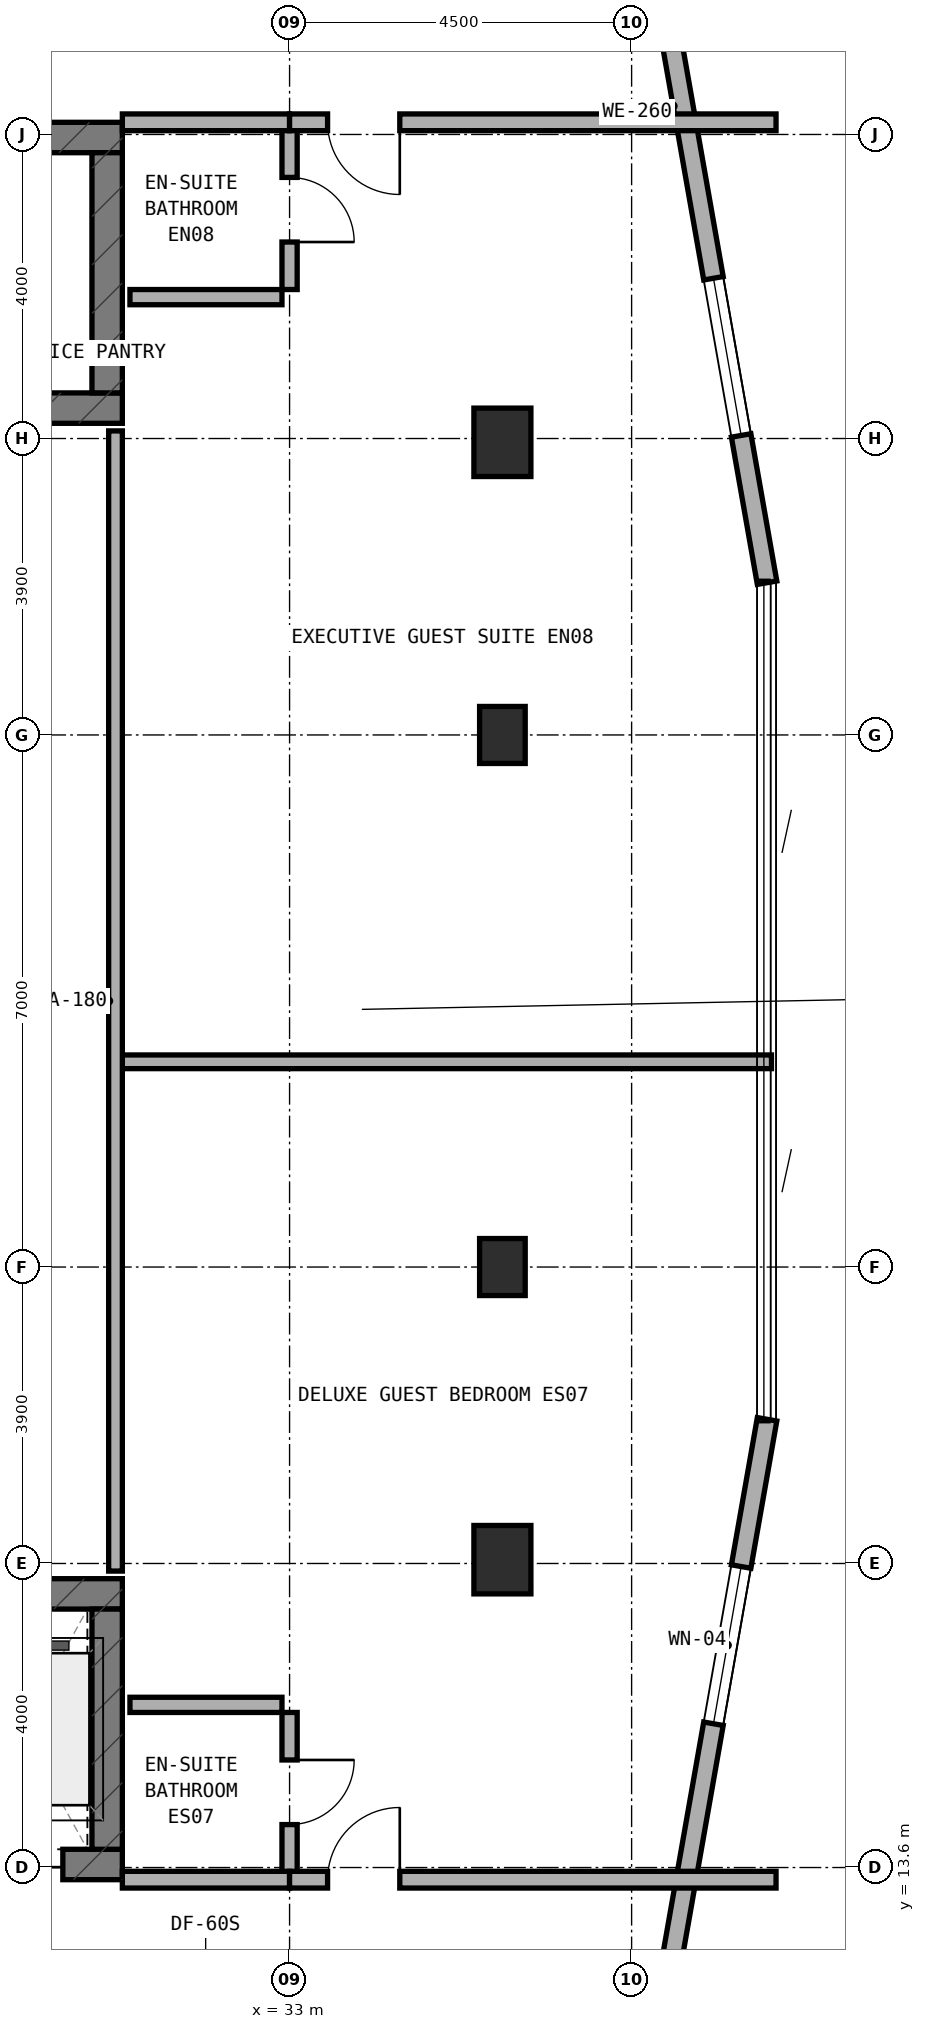
"""IFC4 building model, lengths in metres.
Left out: names, types, materials, properties, quantities, classifications, styles, units other than length and angle.
Written with IfcOpenShell. Run it as: python <this file> out.ifc"""

import sys

from ifc_helpers import new_model, si_unit, direction, frame, frame_2d, origin, origin_2d, place, context, subcontext, project, spatial, rectangle, extrude, element, fill, save


model = new_model("IFC4")
c1 = context("Model", 3, precision=1e-05, world=origin(), true_north=direction((0.0, 1.0)))
c2 = subcontext(c1, "Body", "Model", "MODEL_VIEW")
j1 = project(units=[si_unit("LENGTHUNIT", "METRE"), si_unit("PLANEANGLEUNIT", "RADIAN")], contexts=[c1])
p1 = place(None, origin())
s1 = spatial("IfcSite", under=j1, at=p1, CompositionType="ELEMENT")
p2 = place(p1, origin())
s2 = spatial("IfcBuilding", under=s1, at=p2, CompositionType="ELEMENT")
p3 = place(p2, frame((0.0, 0.0, 246.8)))
s3 = spatial("IfcBuildingStorey", under=s2, at=p3, CompositionType="ELEMENT", Elevation=246.8)
p4 = place(p3, frame((6.4, 32.8, 0.0), z_axis=(0.0, 0.0, 1.0), x_axis=(1.0, 0.0, 0.0)))
e1 = element("IfcWall", 1, at=p4, inside=s3, PredefinedType="SHEAR", context=c2, shape_type="SweptSolid", body=[
    extrude(rectangle(XDim=24.4, YDim=0.4, at=frame_2d((12.2, 0.0))), origin(), (0.0, 0.0, 1.0), 3.6),
])
p5 = place(p4, frame((6.05, 0.0, 0.0)))
e2 = element("IfcOpeningElement", 2, at=p5, cuts=e1, PredefinedType="OPENING", context=c2, shape_type="SweptSolid", body=[
    extrude(rectangle(XDim=1.1, YDim=2.15, at=frame_2d((0.55, 1.075))), frame((0.0, 0.21, 0.0), z_axis=(0.0, -1.0, 0.0), x_axis=(1.0, 0.0, 0.0)), (0.0, 0.0, 1.0), 0.42),
])
p6 = place(p3, frame((6.4, 36.36, 0.0), z_axis=(0.0, 0.0, 1.0), x_axis=(1.0, 0.0, 0.0)))
e3 = element("IfcWall", 3, at=p6, inside=s3, PredefinedType="SHEAR", context=c2, shape_type="SweptSolid", body=[
    extrude(rectangle(XDim=24.4, YDim=0.4, at=frame_2d((12.2, 0.0))), origin(), (0.0, 0.0, 1.0), 3.6),
])
p7 = place(p6, frame((9.15, 0.0, 0.0)))
e4 = element("IfcOpeningElement", 4, at=p7, cuts=e3, PredefinedType="OPENING", context=c2, shape_type="SweptSolid", body=[
    extrude(rectangle(XDim=1.2, YDim=2.15, at=frame_2d((0.6, 1.075))), frame((0.0, 0.21, 0.0), z_axis=(0.0, -1.0, 0.0), x_axis=(1.0, 0.0, 0.0)), (0.0, 0.0, 1.0), 0.42),
])
p8 = place(p6, frame((19.2, 0.0, 0.0)))
e5 = element("IfcOpeningElement", 5, at=p8, cuts=e3, PredefinedType="OPENING", context=c2, shape_type="SweptSolid", body=[
    extrude(rectangle(XDim=0.85, YDim=2.1, at=frame_2d((0.425, 1.05))), frame((0.0, 0.21, 0.0), z_axis=(0.0, -1.0, 0.0), x_axis=(1.0, 0.0, 0.0)), (0.0, 0.0, 1.0), 0.42),
])
p9 = place(p6, frame((17.22, 0.0, 0.0)))
e6 = element("IfcOpeningElement", 6, at=p9, cuts=e3, PredefinedType="OPENING", context=c2, shape_type="SweptSolid", body=[
    extrude(rectangle(XDim=0.85, YDim=2.1, at=frame_2d((0.425, 1.05))), frame((0.0, 0.21, 0.0), z_axis=(0.0, -1.0, 0.0), x_axis=(1.0, 0.0, 0.0)), (0.0, 0.0, 1.0), 0.42),
])
p10 = place(p3, frame((30.6, 33.0, 0.0), z_axis=(0.0, 0.0, 1.0), x_axis=(0.0, 1.0, 0.0)))
e7 = element("IfcWall", 7, at=p10, inside=s3, PredefinedType="SHEAR", context=c2, shape_type="SweptSolid", body=[
    extrude(rectangle(XDim=3.16, YDim=0.4, at=frame_2d((1.58, 0.0))), origin(), (0.0, 0.0, 1.0), 3.6),
])
p11 = place(p3, frame((6.4, 13.64, 0.0), z_axis=(0.0, 0.0, 1.0), x_axis=(1.0, 0.0, 0.0)))
e8 = element("IfcWall", 8, at=p11, inside=s3, PredefinedType="SHEAR", context=c2, shape_type="SweptSolid", body=[
    extrude(rectangle(XDim=24.4, YDim=0.4, at=frame_2d((12.2, 0.0))), origin(), (0.0, 0.0, 1.0), 3.6),
])
p12 = place(p11, frame((9.15, 0.0, 0.0)))
e9 = element("IfcOpeningElement", 9, at=p12, cuts=e8, PredefinedType="OPENING", context=c2, shape_type="SweptSolid", body=[
    extrude(rectangle(XDim=1.2, YDim=2.15, at=frame_2d((0.6, 1.075))), frame((0.0, 0.21, 0.0), z_axis=(0.0, -1.0, 0.0), x_axis=(1.0, 0.0, 0.0)), (0.0, 0.0, 1.0), 0.42),
])
p13 = place(p11, frame((17.22, 0.0, 0.0)))
e10 = element("IfcOpeningElement", 10, at=p13, cuts=e8, PredefinedType="OPENING", context=c2, shape_type="SweptSolid", body=[
    extrude(rectangle(XDim=0.85, YDim=2.1, at=frame_2d((0.425, 1.05))), frame((0.0, 0.21, 0.0), z_axis=(0.0, -1.0, 0.0), x_axis=(1.0, 0.0, 0.0)), (0.0, 0.0, 1.0), 0.42),
])
p14 = place(p11, frame((18.783, 0.0, 0.0)))
e11 = element("IfcOpeningElement", 11, at=p14, cuts=e8, PredefinedType="OPENING", context=c2, shape_type="SweptSolid", body=[
    extrude(rectangle(XDim=1.1, YDim=2.15, at=frame_2d((0.55, 1.075))), frame((0.0, 0.21, 0.0), z_axis=(0.0, -1.0, 0.0), x_axis=(1.0, 0.0, 0.0)), (0.0, 0.0, 1.0), 0.42),
])
p15 = place(p11, frame((20.65, 0.0, 0.0)))
e12 = element("IfcOpeningElement", 12, at=p15, cuts=e8, PredefinedType="OPENING", context=c2, shape_type="SweptSolid", body=[
    extrude(rectangle(XDim=1.1, YDim=2.15, at=frame_2d((0.55, 1.075))), frame((0.0, 0.21, 0.0), z_axis=(0.0, -1.0, 0.0), x_axis=(1.0, 0.0, 0.0)), (0.0, 0.0, 1.0), 0.42),
])
p16 = place(p11, frame((22.517, 0.0, 0.0)))
e13 = element("IfcOpeningElement", 13, at=p16, cuts=e8, PredefinedType="OPENING", context=c2, shape_type="SweptSolid", body=[
    extrude(rectangle(XDim=1.1, YDim=2.15, at=frame_2d((0.55, 1.075))), frame((0.0, 0.21, 0.0), z_axis=(0.0, -1.0, 0.0), x_axis=(1.0, 0.0, 0.0)), (0.0, 0.0, 1.0), 0.42),
])
p17 = place(p3, frame((6.4, 17.2, 0.0), z_axis=(0.0, 0.0, 1.0), x_axis=(1.0, 0.0, 0.0)))
e14 = element("IfcWall", 14, at=p17, inside=s3, PredefinedType="SHEAR", context=c2, shape_type="SweptSolid", body=[
    extrude(rectangle(XDim=24.4, YDim=0.4, at=frame_2d((12.2, 0.0))), origin(), (0.0, 0.0, 1.0), 3.6),
])
p18 = place(p3, frame((30.6, 13.84, 0.0), z_axis=(0.0, 0.0, 1.0), x_axis=(0.0, 1.0, 0.0)))
e15 = element("IfcWall", 15, at=p18, inside=s3, PredefinedType="SHEAR", context=c2, shape_type="SweptSolid", body=[
    extrude(rectangle(XDim=3.16, YDim=0.4, at=frame_2d((1.58, 0.0))), origin(), (0.0, 0.0, 1.0), 3.6),
])
for number, where, z_axis, x_axis in (
    (16, (35.8, 21.5, 0.0), (0.0, 0.0, 1.0), (1.0, 0.0, 0.0)),
    (17, (35.8, 28.5, 0.0), (0.0, 0.0, 1.0), (1.0, 0.0, 0.0)),
):
    element("IfcColumn", number, at=place(p3, frame(where, z_axis=z_axis, x_axis=x_axis)), inside=s3, PredefinedType="COLUMN", context=c2, shape_type="SweptSolid", body=[
        extrude(rectangle(XDim=0.6, YDim=0.75, at=origin_2d()), origin(), (0.0, 0.0, 1.0), 3.6),
    ])
for number, where, z_axis, x_axis in (
    (18, (35.8, 17.65, 0.0), (0.0, 0.0, 1.0), (1.0, 0.0, 0.0)),
    (19, (35.8, 32.35, 0.0), (0.0, 0.0, 1.0), (1.0, 0.0, 0.0)),
):
    element("IfcColumn", number, at=place(p3, frame(where, z_axis=z_axis, x_axis=x_axis)), inside=s3, PredefinedType="COLUMN", context=c2, shape_type="SweptSolid", body=[
        extrude(rectangle(XDim=0.75, YDim=0.9, at=origin_2d()), origin(), (0.0, 0.0, 1.0), 3.6),
    ])
p19 = place(p3, frame((37.771, 10.915, 0.0), z_axis=(0.0, 0.0, 1.0), x_axis=(0.173396937698, 0.984852020355, 0.0)))
e20 = element("IfcWall", 20, at=p19, inside=s3, PredefinedType="STANDARD", context=c2, shape_type="SweptSolid", body=[
    extrude(rectangle(XDim=8.714, YDim=0.26, at=frame_2d((4.357, 0.0))), origin(), (0.0, 0.0, 1.0), 3.32),
])
p20 = place(p19, frame((4.647, 0.0, 0.85)))
e21 = element("IfcOpeningElement", 21, at=p20, cuts=e20, PredefinedType="OPENING", context=c2, shape_type="SweptSolid", body=[
    extrude(rectangle(XDim=2.1, YDim=1.5, at=frame_2d((1.05, 0.75))), frame((0.0, 0.14, 0.0), z_axis=(0.0, -1.0, 0.0), x_axis=(1.0, 0.0, 0.0)), (0.0, 0.0, 1.0), 0.28),
])
p21 = place(p3, frame((39.282, 30.503, 0.0), z_axis=(0.0, 0.0, 1.0), x_axis=(-0.173396937698, 0.984852020355, 0.0)))
e22 = element("IfcWall", 22, at=p21, inside=s3, PredefinedType="STANDARD", context=c2, shape_type="SweptSolid", body=[
    extrude(rectangle(XDim=8.714, YDim=0.26, at=frame_2d((4.357, 0.0))), origin(), (0.0, 0.0, 1.0), 3.32),
])
p22 = place(p21, frame((1.967, 0.0, 0.85)))
e23 = element("IfcOpeningElement", 23, at=p22, cuts=e22, PredefinedType="OPENING", context=c2, shape_type="SweptSolid", body=[
    extrude(rectangle(XDim=2.1, YDim=1.5, at=frame_2d((1.05, 0.75))), frame((0.0, 0.14, 0.0), z_axis=(0.0, -1.0, 0.0), x_axis=(1.0, 0.0, 0.0)), (0.0, 0.0, 1.0), 0.28),
])
p23 = place(p3, frame((30.8, 24.2, 0.0), z_axis=(0.0, 0.0, 1.0), x_axis=(1.0, 0.0, 0.0)))
e24 = element("IfcWall", 24, at=p23, inside=s3, PredefinedType="SOLIDWALL", context=c2, shape_type="SweptSolid", body=[
    extrude(rectangle(XDim=8.54, YDim=0.18, at=frame_2d((4.27, 0.0))), origin(), (0.0, 0.0, 1.0), 3.015),
])
p24 = place(p3, frame((30.71, 17.5, 0.0), z_axis=(0.0, 0.0, 1.0), x_axis=(0.0, 1.0, 0.0)))
e25 = element("IfcWall", 25, at=p24, inside=s3, PredefinedType="SOLIDWALL", context=c2, shape_type="SweptSolid", body=[
    extrude(rectangle(XDim=15.0, YDim=0.18, at=frame_2d((7.5, 0.0))), origin(), (0.0, 0.0, 1.0), 2.745),
])
p25 = place(p3, frame((33.0, 13.54, 0.0), z_axis=(0.0, 0.0, 1.0), x_axis=(0.0, 1.0, 0.0)))
e26 = element("IfcWall", 26, at=p25, inside=s3, PredefinedType="PLUMBINGWALL", context=c2, shape_type="SweptSolid", body=[
    extrude(rectangle(XDim=2.1, YDim=0.2, at=frame_2d((1.05, 0.0))), origin(), (0.0, 0.0, 1.0), 3.32),
])
p26 = place(p25, frame((0.625, 0.0, 0.0)))
e27 = element("IfcOpeningElement", 27, at=p26, cuts=e26, PredefinedType="OPENING", context=c2, shape_type="SweptSolid", body=[
    extrude(rectangle(XDim=0.85, YDim=2.1, at=frame_2d((0.425, 1.05))), frame((0.0, 0.11, 0.0), z_axis=(0.0, -1.0, 0.0), x_axis=(1.0, 0.0, 0.0)), (0.0, 0.0, 1.0), 0.22),
])
p27 = place(p3, frame((30.9, 15.74, 0.0), z_axis=(0.0, 0.0, 1.0), x_axis=(1.0, 0.0, 0.0)))
e28 = element("IfcWall", 28, at=p27, inside=s3, PredefinedType="PLUMBINGWALL", context=c2, shape_type="SweptSolid", body=[
    extrude(rectangle(XDim=2.0, YDim=0.2, at=frame_2d((1.0, 0.0))), origin(), (0.0, 0.0, 1.0), 3.32),
])
p28 = place(p3, frame((30.8, 13.44, 0.0), z_axis=(0.0, 0.0, 1.0), x_axis=(1.0, 0.0, 0.0)))
e29 = element("IfcWall", 29, at=p28, inside=s3, PredefinedType="SOLIDWALL", context=c2, shape_type="SweptSolid", body=[
    extrude(rectangle(XDim=2.2, YDim=0.22, at=frame_2d((1.1, 0.0))), origin(), (0.0, 0.0, 1.0), 3.32),
])
p29 = place(p3, frame((33.0, 13.44, 0.0), z_axis=(0.0, 0.0, 1.0), x_axis=(1.0, 0.0, 0.0)))
e30 = element("IfcWall", 30, at=p29, inside=s3, PredefinedType="SOLIDWALL", context=c2, shape_type="SweptSolid", body=[
    extrude(rectangle(XDim=6.4, YDim=0.22, at=frame_2d((3.2, 0.0))), origin(), (0.0, 0.0, 1.0), 2.745),
])
p30 = place(p29, frame((0.5, 0.0, 0.0)))
e31 = element("IfcOpeningElement", 31, at=p30, cuts=e30, PredefinedType="OPENING", context=c2, shape_type="SweptSolid", body=[
    extrude(rectangle(XDim=0.95, YDim=2.1, at=frame_2d((0.475, 1.05))), frame((0.0, 0.12, 0.0), z_axis=(0.0, -1.0, 0.0), x_axis=(1.0, 0.0, 0.0)), (0.0, 0.0, 1.0), 0.24),
])
p31 = place(p3, frame((33.0, 34.36, 0.0), z_axis=(0.0, 0.0, 1.0), x_axis=(0.0, 1.0, 0.0)))
e32 = element("IfcWall", 32, at=p31, inside=s3, PredefinedType="PLUMBINGWALL", context=c2, shape_type="SweptSolid", body=[
    extrude(rectangle(XDim=2.1, YDim=0.2, at=frame_2d((1.05, 0.0))), origin(), (0.0, 0.0, 1.0), 3.32),
])
p32 = place(p31, frame((0.625, 0.0, 0.0)))
e33 = element("IfcOpeningElement", 33, at=p32, cuts=e32, PredefinedType="OPENING", context=c2, shape_type="SweptSolid", body=[
    extrude(rectangle(XDim=0.85, YDim=2.1, at=frame_2d((0.425, 1.05))), frame((0.0, 0.11, 0.0), z_axis=(0.0, -1.0, 0.0), x_axis=(1.0, 0.0, 0.0)), (0.0, 0.0, 1.0), 0.22),
])
p33 = place(p3, frame((30.9, 34.26, 0.0), z_axis=(0.0, 0.0, 1.0), x_axis=(1.0, 0.0, 0.0)))
e34 = element("IfcWall", 34, at=p33, inside=s3, PredefinedType="PLUMBINGWALL", context=c2, shape_type="SweptSolid", body=[
    extrude(rectangle(XDim=2.0, YDim=0.2, at=frame_2d((1.0, 0.0))), origin(), (0.0, 0.0, 1.0), 3.32),
])
p34 = place(p3, frame((30.8, 36.56, 0.0), z_axis=(0.0, 0.0, 1.0), x_axis=(1.0, 0.0, 0.0)))
e35 = element("IfcWall", 35, at=p34, inside=s3, PredefinedType="SOLIDWALL", context=c2, shape_type="SweptSolid", body=[
    extrude(rectangle(XDim=2.2, YDim=0.22, at=frame_2d((1.1, 0.0))), origin(), (0.0, 0.0, 1.0), 3.32),
])
p35 = place(p3, frame((33.0, 36.56, 0.0), z_axis=(0.0, 0.0, 1.0), x_axis=(1.0, 0.0, 0.0)))
e36 = element("IfcWall", 36, at=p35, inside=s3, PredefinedType="SOLIDWALL", context=c2, shape_type="SweptSolid", body=[
    extrude(rectangle(XDim=6.4, YDim=0.22, at=frame_2d((3.2, 0.0))), origin(), (0.0, 0.0, 1.0), 2.745),
])
p36 = place(p35, frame((0.5, 0.0, 0.0)))
e37 = element("IfcOpeningElement", 37, at=p36, cuts=e36, PredefinedType="OPENING", context=c2, shape_type="SweptSolid", body=[
    extrude(rectangle(XDim=0.95, YDim=2.1, at=frame_2d((0.475, 1.05))), frame((0.0, 0.12, 0.0), z_axis=(0.0, -1.0, 0.0), x_axis=(1.0, 0.0, 0.0)), (0.0, 0.0, 1.0), 0.24),
])
p37 = place(p20, origin())
e38 = element("IfcWindow", 38, at=p37, inside=s3, PartitioningType="SINGLE_PANEL", PredefinedType="WINDOW", context=c2, shape_type="SweptSolid", body=[
    extrude(rectangle(XDim=2.1, YDim=1.5, at=frame_2d((1.05, 0.75))), frame((0.0, 0.03, 0.0), z_axis=(0.0, -1.0, 0.0), x_axis=(1.0, 0.0, 0.0)), (0.0, 0.0, 1.0), 0.06),
])
fill(e21, e38)
p38 = place(p22, origin())
e39 = element("IfcWindow", 39, at=p38, inside=s3, PartitioningType="SINGLE_PANEL", PredefinedType="WINDOW", context=c2, shape_type="SweptSolid", body=[
    extrude(rectangle(XDim=2.1, YDim=1.5, at=frame_2d((1.05, 0.75))), frame((0.0, 0.03, 0.0), z_axis=(0.0, -1.0, 0.0), x_axis=(1.0, 0.0, 0.0)), (0.0, 0.0, 1.0), 0.06),
])
fill(e23, e39)
p39 = place(p16, frame((1.1, 0.0, 0.0), z_axis=(0.0, 0.0, 1.0), x_axis=(-1.0, 0.0, 0.0)))
e40 = element("IfcDoor", 40, at=p39, inside=s3, OperationType="DOUBLE_DOOR_SLIDING", PredefinedType="DOOR", context=c2, shape_type="SweptSolid", body=[
    extrude(rectangle(XDim=1.1, YDim=2.15, at=frame_2d((0.55, 1.075))), frame((0.0, 0.025, 0.0), z_axis=(0.0, -1.0, 0.0), x_axis=(1.0, 0.0, 0.0)), (0.0, 0.0, 1.0), 0.05),
])
fill(e13, e40)
p40 = place(p26, frame((0.85, 0.0, 0.0), z_axis=(0.0, 0.0, 1.0), x_axis=(-1.0, 0.0, 0.0)))
e41 = element("IfcDoor", 41, at=p40, inside=s3, OperationType="SINGLE_SWING_LEFT", PredefinedType="DOOR", context=c2, shape_type="SweptSolid", body=[
    extrude(rectangle(XDim=0.85, YDim=2.1, at=frame_2d((0.425, 1.05))), frame((0.0, 0.025, 0.0), z_axis=(0.0, -1.0, 0.0), x_axis=(1.0, 0.0, 0.0)), (0.0, 0.0, 1.0), 0.05),
])
fill(e27, e41)
p41 = place(p30, origin())
e42 = element("IfcDoor", 42, at=p41, inside=s3, OperationType="SINGLE_SWING_RIGHT", PredefinedType="DOOR", context=c2, shape_type="SweptSolid", body=[
    extrude(rectangle(XDim=0.95, YDim=2.1, at=frame_2d((0.475, 1.05))), frame((0.0, 0.025, 0.0), z_axis=(0.0, -1.0, 0.0), x_axis=(1.0, 0.0, 0.0)), (0.0, 0.0, 1.0), 0.05),
])
fill(e31, e42)
p42 = place(p32, frame((0.85, 0.0, 0.0), z_axis=(0.0, 0.0, 1.0), x_axis=(-1.0, 0.0, 0.0)))
e43 = element("IfcDoor", 43, at=p42, inside=s3, OperationType="SINGLE_SWING_RIGHT", PredefinedType="DOOR", context=c2, shape_type="SweptSolid", body=[
    extrude(rectangle(XDim=0.85, YDim=2.1, at=frame_2d((0.425, 1.05))), frame((0.0, 0.025, 0.0), z_axis=(0.0, -1.0, 0.0), x_axis=(1.0, 0.0, 0.0)), (0.0, 0.0, 1.0), 0.05),
])
fill(e33, e43)
p43 = place(p36, frame((0.95, 0.0, 0.0), z_axis=(0.0, 0.0, 1.0), x_axis=(-1.0, 0.0, 0.0)))
e44 = element("IfcDoor", 44, at=p43, inside=s3, OperationType="SINGLE_SWING_LEFT", PredefinedType="DOOR", context=c2, shape_type="SweptSolid", body=[
    extrude(rectangle(XDim=0.95, YDim=2.1, at=frame_2d((0.475, 1.05))), frame((0.0, 0.025, 0.0), z_axis=(0.0, -1.0, 0.0), x_axis=(1.0, 0.0, 0.0)), (0.0, 0.0, 1.0), 0.05),
])
fill(e37, e44)
save(model, sys.argv[1])
